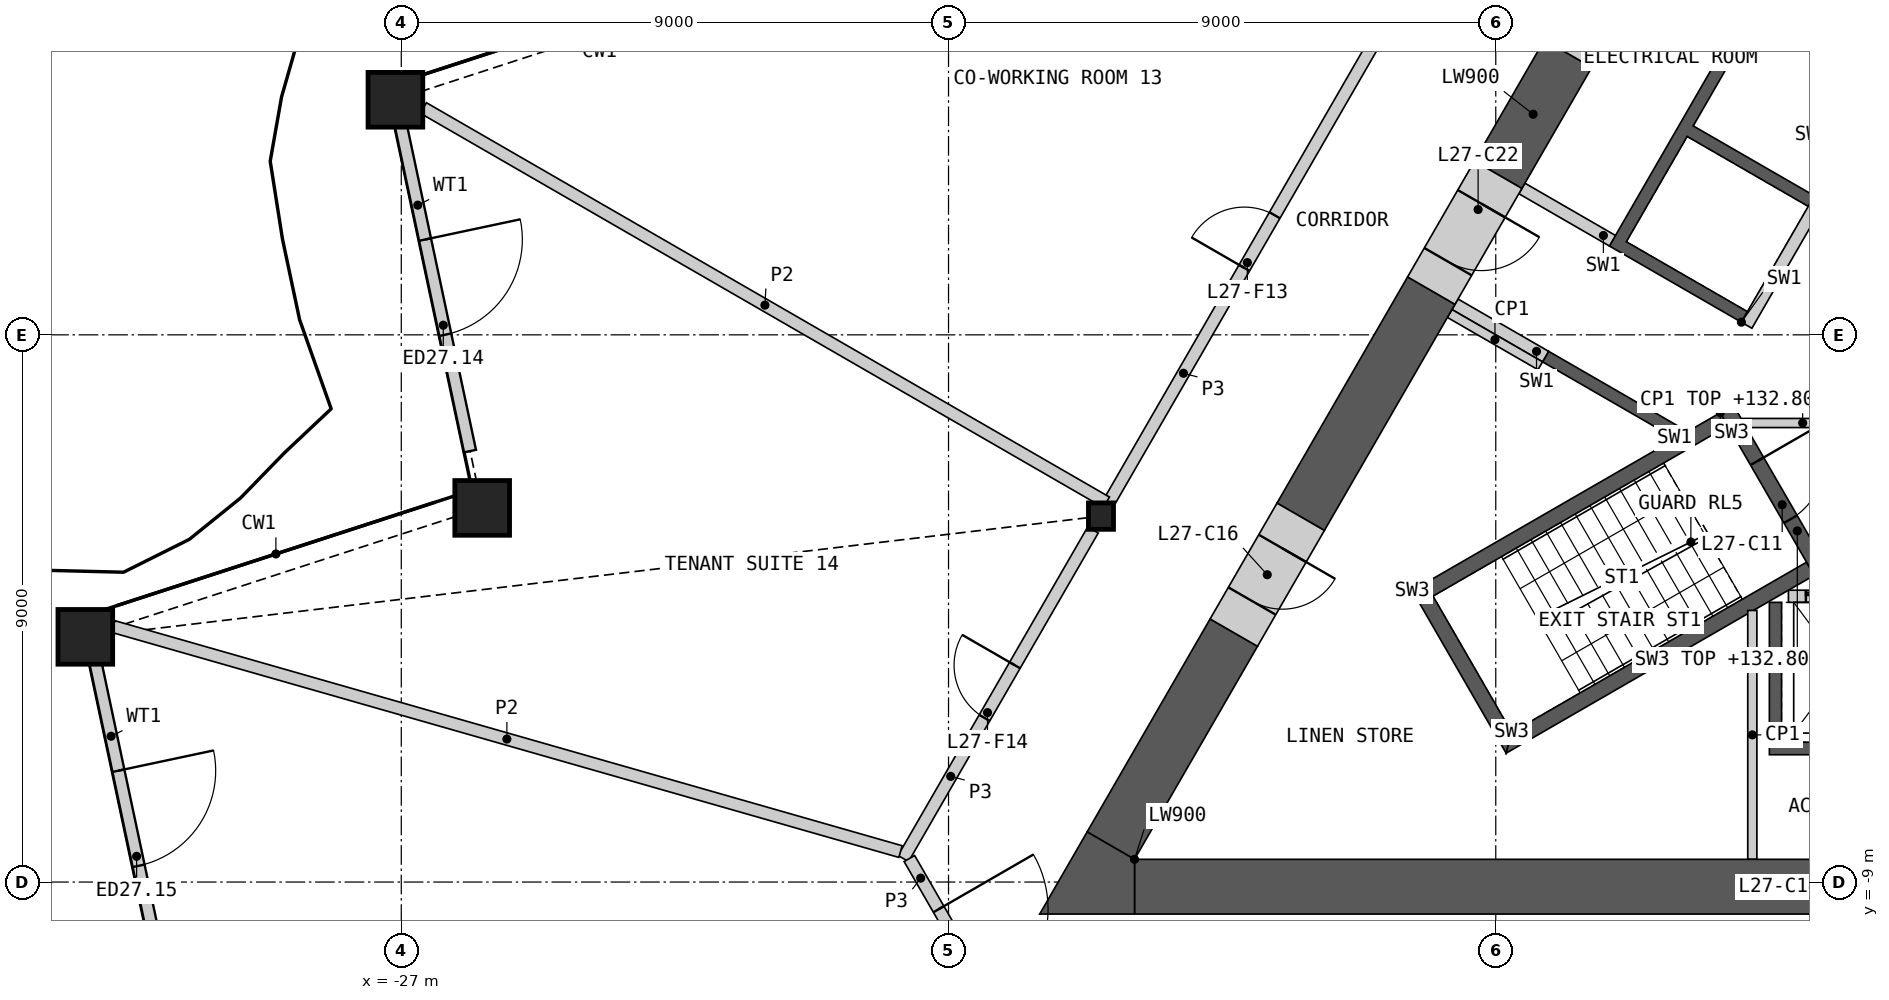
"""IFC4 building model, lengths in metres.
Left out: names, types, materials, properties, quantities, classifications, styles, units other than length and angle.
Written with IfcOpenShell. Run it as: python <this file> out.ifc"""

import sys

from ifc_helpers import new_model, si_unit, direction, frame, frame_2d, origin, origin_2d, place, context, subcontext, project, spatial, polyline, rectangle, hollow_rectangle, i_section, outline, extrude, element, fill, save


model = new_model("IFC4")
c1 = context("Model", 3, precision=1e-05, world=origin(), true_north=direction((0.0, 1.0)))
c2 = subcontext(c1, "Body", "Model", "MODEL_VIEW")
j1 = project(units=[si_unit("LENGTHUNIT", "METRE"), si_unit("PLANEANGLEUNIT", "RADIAN")], contexts=[c1])
p1 = place(None, origin())
s1 = spatial("IfcSite", under=j1, at=p1, CompositionType="ELEMENT")
p2 = place(p1, origin())
s2 = spatial("IfcBuilding", under=s1, at=p2, CompositionType="ELEMENT")
p3 = place(p2, frame((0.0, 0.0, 129.0)))
s3 = spatial("IfcBuildingStorey", under=s2, at=p3, CompositionType="ELEMENT", Elevation=129.0)
for number, where, z_axis, x_axis in (
    (1, (-27.096, 3.866, 0.0), (0.0, 0.0, 1.0), (1.0, 0.0, 0.0)),
    (2, (-25.669, -2.846, 0.0), (0.0, 0.0, 1.0), (1.0, 0.0, 0.0)),
    (3, (-32.196, -4.967, 0.0), (0.0, 0.0, 1.0), (1.0, 0.0, 0.0)),
):
    element("IfcColumn", number, at=place(p3, frame(where, z_axis=z_axis, x_axis=x_axis)), inside=s3, PredefinedType="COLUMN", context=c2, shape_type="SweptSolid", body=[
        extrude(hollow_rectangle(XDim=0.9, YDim=0.9, WallThickness=0.06, at=origin_2d()), origin(), (0.0, 0.0, 1.0), 4.2),
    ])
p4 = place(p3, frame((-15.493, -2.982, 0.0), z_axis=(0.0, 0.0, 1.0), x_axis=(1.0, 0.0, 0.0)))
e4 = element("IfcColumn", 4, at=p4, inside=s3, PredefinedType="COLUMN", context=c2, shape_type="SweptSolid", body=[
    extrude(i_section(OverallWidth=0.412, OverallDepth=0.435, WebThickness=0.036, FlangeThickness=0.057, at=origin_2d()), origin(), (0.0, 0.0, 1.0), 4.2),
])
p5 = place(p3, frame((-27.016, 3.482, 0.0), z_axis=(0.0, 0.0, 1.0), x_axis=(0.207902173992, -0.978149623549, 0.0)))
e5 = element("IfcWall", 5, at=p5, inside=s3, PredefinedType="SOLIDWALL", context=c2, shape_type="SweptSolid", body=[
    extrude(rectangle(XDim=5.515, YDim=0.2, at=frame_2d((2.757, 0.0))), origin(), (0.0, 0.0, 1.0), 3.189),
])
p6 = place(p5, frame((1.957, 0.0, 0.0)))
e6 = element("IfcOpeningElement", 6, at=p6, cuts=e5, PredefinedType="OPENING", context=c2, shape_type="SweptSolid", body=[
    extrude(rectangle(XDim=1.6, YDim=2.4, at=frame_2d((0.8, 1.2))), frame((0.0, 0.11, 0.0), z_axis=(0.0, -1.0, 0.0), x_axis=(1.0, 0.0, 0.0)), (0.0, 0.0, 1.0), 0.22),
])
p7 = place(p3, frame((-32.059, -5.254, 0.0), z_axis=(0.0, 0.0, 1.0), x_axis=(0.207902173992, -0.978149623549, 0.0)))
e7 = element("IfcWall", 7, at=p7, inside=s3, PredefinedType="SOLIDWALL", context=c2, shape_type="SweptSolid", body=[
    extrude(rectangle(XDim=5.515, YDim=0.2, at=frame_2d((2.757, 0.0))), origin(), (0.0, 0.0, 1.0), 3.189),
])
p8 = place(p7, frame((1.957, 0.0, 0.0)))
e8 = element("IfcOpeningElement", 8, at=p8, cuts=e7, PredefinedType="OPENING", context=c2, shape_type="SweptSolid", body=[
    extrude(rectangle(XDim=1.6, YDim=2.4, at=frame_2d((0.8, 1.2))), frame((0.0, 0.11, 0.0), z_axis=(0.0, -1.0, 0.0), x_axis=(1.0, 0.0, 0.0)), (0.0, 0.0, 1.0), 0.22),
])
p9 = place(p3, origin())
e9 = element("IfcWall", 9, at=p9, inside=s3, PredefinedType="SHEAR", context=c2, shape_type="SweptSolid", body=[
    extrude(outline(polyline([(4.5, -4.4), (4.5, -6.906), (-4.5, -6.906), (-4.5, -4.4), (-4.3, -4.4), (-4.3, -6.7), (-2.3, -6.7), (-2.3, -4.4), (-2.1, -4.4), (-2.1, -6.7), (-0.1, -6.7), (-0.1, -4.4), (0.1, -4.4), (0.1, -6.7), (2.1, -6.7), (2.1, -4.4), (2.3, -4.4), (2.3, -6.7), (4.3, -6.7), (4.3, -4.4), (4.5, -4.4)])), origin(), (0.0, 0.0, 1.0), 3.8),
])
p10 = place(p3, frame((-4.187, -4.3, 0.0), z_axis=(0.0, 0.0, 1.0), x_axis=(1.0, 0.0, 0.0)))
e10 = element("IfcWall", 10, at=p10, inside=s3, PredefinedType="SOLIDWALL", context=c2, shape_type="SweptSolid", body=[
    extrude(rectangle(XDim=8.373, YDim=0.2, at=frame_2d((4.187, 0.0))), origin(), (0.0, 0.0, 1.0), 3.8),
])
p11 = place(p10, frame((0.287, 0.0, 0.0)))
e11 = element("IfcOpeningElement", 11, at=p11, cuts=e10, PredefinedType="OPENING", context=c2, shape_type="SweptSolid", body=[
    extrude(rectangle(XDim=1.2, YDim=2.1, at=frame_2d((0.6, 1.05))), frame((0.0, 0.11, 0.0), z_axis=(0.0, -1.0, 0.0), x_axis=(1.0, 0.0, 0.0)), (0.0, 0.0, 1.0), 0.22),
])
p12 = place(p10, frame((2.387, 0.0, 0.0)))
e12 = element("IfcOpeningElement", 12, at=p12, cuts=e10, PredefinedType="OPENING", context=c2, shape_type="SweptSolid", body=[
    extrude(rectangle(XDim=1.4, YDim=2.1, at=frame_2d((0.7, 1.05))), frame((0.0, 0.11, 0.0), z_axis=(0.0, -1.0, 0.0), x_axis=(1.0, 0.0, 0.0)), (0.0, 0.0, 1.0), 0.22),
])
p13 = place(p10, frame((4.737, 0.0, 0.0)))
e13 = element("IfcOpeningElement", 13, at=p13, cuts=e10, PredefinedType="OPENING", context=c2, shape_type="SweptSolid", body=[
    extrude(rectangle(XDim=1.1, YDim=2.1, at=frame_2d((0.55, 1.05))), frame((0.0, 0.11, 0.0), z_axis=(0.0, -1.0, 0.0), x_axis=(1.0, 0.0, 0.0)), (0.0, 0.0, 1.0), 0.22),
])
p14 = place(p10, frame((6.887, 0.0, 0.0)))
e14 = element("IfcOpeningElement", 14, at=p14, cuts=e10, PredefinedType="OPENING", context=c2, shape_type="SweptSolid", body=[
    extrude(rectangle(XDim=1.2, YDim=2.1, at=frame_2d((0.6, 1.05))), frame((0.0, 0.11, 0.0), z_axis=(0.0, -1.0, 0.0), x_axis=(1.0, 0.0, 0.0)), (0.0, 0.0, 1.0), 0.22),
])
p15 = place(p3, origin())
e15 = element("IfcWall", 15, at=p15, inside=s3, PredefinedType="SHEAR", context=c2, shape_type="SweptSolid", body=[
    extrude(outline(polyline([(-6.061, -1.697), (-8.231, -0.444), (-8.131, -0.271), (-5.96, -1.524), (-6.061, -1.697)])), origin(), (0.0, 0.0, 1.0), 3.8),
])
p16 = place(p3, origin())
e16 = element("IfcWall", 16, at=p16, inside=s3, PredefinedType="SHEAR", context=c2, shape_type="SweptSolid", body=[
    extrude(outline(polyline([(-4.96, 0.208), (-7.131, 1.461), (-3.731, 7.35), (-1.561, 6.097), (-1.66, 5.924), (-3.652, 7.074), (-5.752, 3.437), (-3.76, 2.287), (-3.861, 2.113), (-5.852, 3.263), (-6.852, 1.531), (-4.861, 0.381), (-4.96, 0.208)])), origin(), (0.0, 0.0, 1.0), 3.8),
])
p17 = place(p3, frame((-1.631, 5.776, 0.0), z_axis=(0.0, 0.0, 1.0), x_axis=(-0.499992876559, -0.866029516466, 0.0)))
e17 = element("IfcWall", 17, at=p17, inside=s3, PredefinedType="SOLIDWALL", context=c2, shape_type="SweptSolid", body=[
    extrude(rectangle(XDim=6.486, YDim=0.2, at=frame_2d((3.243, 0.0))), origin(), (0.0, 0.0, 1.0), 3.8),
])
p18 = place(p17, frame((1.537, 0.0, 0.0)))
e18 = element("IfcOpeningElement", 18, at=p18, cuts=e17, PredefinedType="OPENING", context=c2, shape_type="SweptSolid", body=[
    extrude(rectangle(XDim=0.9, YDim=2.1, at=frame_2d((0.45, 1.05))), frame((0.0, 0.11, 0.0), z_axis=(0.0, -1.0, 0.0), x_axis=(1.0, 0.0, 0.0)), (0.0, 0.0, 1.0), 0.22),
])
for number, where, z_axis, x_axis in (
    (19, (-7.081, 1.548, 0.0), (0.0, 0.0, 1.0), (-0.866, 0.5, 0.0)),
    (20, (-8.181, -0.357, 0.0), (0.0, 0.0, 1.0), (-0.866, 0.5, 0.0)),
):
    element("IfcWall", number, at=place(p3, frame(where, z_axis=z_axis, x_axis=x_axis)), inside=s3, PredefinedType="SHEAR", context=c2, shape_type="SweptSolid", body=[
        extrude(rectangle(XDim=1.72, YDim=0.2, at=frame_2d((0.86, 0.0))), origin(), (0.0, 0.0, 1.0), 3.8),
    ])
p19 = place(p3, frame((-4.941, -1.45, 0.0), z_axis=(0.0, 0.0, 1.0), x_axis=(1.0, 0.0, 0.0)))
e21 = element("IfcWall", 21, at=p19, inside=s3, PredefinedType="PARTITIONING", context=c2, shape_type="SweptSolid", body=[
    extrude(rectangle(XDim=9.882, YDim=0.15, at=frame_2d((4.941, 0.0))), origin(), (0.0, 0.0, 1.0), 3.8),
])
p20 = place(p19, frame((4.391, 0.0, 0.0)))
e22 = element("IfcOpeningElement", 22, at=p20, cuts=e21, PredefinedType="OPENING", context=c2, shape_type="SweptSolid", body=[
    extrude(rectangle(XDim=1.1, YDim=2.1, at=frame_2d((0.55, 1.05))), frame((0.0, 0.085, 0.0), z_axis=(0.0, -1.0, 0.0), x_axis=(1.0, 0.0, 0.0)), (0.0, 0.0, 1.0), 0.17),
])
p21 = place(p3, origin())
e23 = element("IfcWall", 23, at=p21, inside=s3, PredefinedType="SHEAR", context=c2, shape_type="SweptSolid", body=[
    extrude(outline(polyline([(-5.307, -1.281), (-10.374, -4.206), (-10.032, -4.298), (-5.182, -1.498), (-5.307, -1.281)])), origin(), (0.0, 0.0, 1.0), 3.8),
])
p22 = place(p3, origin())
e24 = element("IfcWall", 24, at=p22, inside=s3, PredefinedType="SHEAR", context=c2, shape_type="SweptSolid", body=[
    extrude(outline(polyline([(-10.374, -4.206), (-8.83, -6.881), (-8.738, -6.539), (-10.032, -4.298), (-10.374, -4.206)])), origin(), (0.0, 0.0, 1.0), 3.8),
])
p23 = place(p3, origin())
e25 = element("IfcWall", 25, at=p23, inside=s3, PredefinedType="SHEAR", context=c2, shape_type="SweptSolid", body=[
    extrude(outline(polyline([(-8.738, -6.539), (-8.83, -6.881), (-3.763, -3.956), (-3.888, -3.739), (-8.738, -6.539)])), origin(), (0.0, 0.0, 1.0), 3.8),
])
p24 = place(p3, frame((-5.199, -1.219, 0.0), z_axis=(0.0, 0.0, 1.0), x_axis=(0.499982516597, -0.866035497597, 0.0)))
e26 = element("IfcWall", 26, at=p24, inside=s3, PredefinedType="SHEAR", context=c2, shape_type="SweptSolid", body=[
    extrude(rectangle(XDim=3.088, YDim=0.25, at=frame_2d((1.544, 0.0))), origin(), (0.0, 0.0, 1.0), 3.8),
])
p25 = place(p24, frame((0.994, 0.0, 0.0)))
e27 = element("IfcOpeningElement", 27, at=p25, cuts=e26, PredefinedType="OPENING", context=c2, shape_type="SweptSolid", body=[
    extrude(rectangle(XDim=1.1, YDim=2.1, at=frame_2d((0.55, 1.05))), frame((0.0, 0.135, 0.0), z_axis=(0.0, -1.0, 0.0), x_axis=(1.0, 0.0, 0.0)), (0.0, 0.0, 1.0), 0.27),
])
p26 = place(p3, frame((-8.268, -0.509, 0.0), z_axis=(0.0, 0.0, 1.0), x_axis=(-0.866024871741, 0.500000921525, 0.0)))
e28 = element("IfcWall", 28, at=p26, inside=s3, PredefinedType="PARTITIONING", context=c2, shape_type="SweptSolid", body=[
    extrude(rectangle(XDim=1.72, YDim=0.15, at=frame_2d((0.86, 0.0))), origin(), (0.0, 0.0, 1.0), 3.8),
])
p27 = place(p3, frame((-4.781, -8.626, 0.0), z_axis=(0.0, 0.0, 1.0), x_axis=(0.0, 1.0, 0.0)))
e29 = element("IfcWall", 29, at=p27, inside=s3, PredefinedType="PARTITIONING", context=c2, shape_type="SweptSolid", body=[
    extrude(rectangle(XDim=4.093, YDim=0.15, at=frame_2d((2.047, 0.0))), origin(), (0.0, 0.0, 1.0), 3.8),
])
p28 = place(p3, frame((-14.941, -9.076, 0.0), z_axis=(0.0, 0.0, 1.0), x_axis=(1.0, 0.0, 0.0)))
e30 = element("IfcWall", 30, at=p28, inside=s3, PredefinedType="SHEAR", context=c2, shape_type="SweptSolid", body=[
    extrude(rectangle(XDim=11.275, YDim=0.9, at=frame_2d((5.638, 0.0))), origin(), (0.0, 0.0, 1.0), 3.8),
])
p29 = place(p3, frame((-10.06, 0.728, 0.0), z_axis=(0.0, 0.0, 1.0), x_axis=(-0.499996331799, -0.866027521611, 0.0)))
e31 = element("IfcWall", 31, at=p29, inside=s3, PredefinedType="SHEAR", context=c2, shape_type="SweptSolid", body=[
    extrude(rectangle(XDim=4.295, YDim=0.9, at=frame_2d((2.148, 0.0))), origin(), (0.0, 0.0, 1.0), 3.8),
])
p30 = place(p3, frame((-13.308, -4.898, 0.0), z_axis=(0.0, 0.0, 1.0), x_axis=(-0.499974938593, -0.866039872511, 0.0)))
e32 = element("IfcWall", 32, at=p30, inside=s3, PredefinedType="SHEAR", context=c2, shape_type="SweptSolid", body=[
    extrude(rectangle(XDim=4.046, YDim=0.9, at=frame_2d((2.023, 0.0))), origin(), (0.0, 0.0, 1.0), 3.8),
])
p31 = place(p3, frame((-7.81, 4.625, 0.0), z_axis=(0.0, 0.0, 1.0), x_axis=(-0.499952165731, -0.866053019151, 0.0)))
e33 = element("IfcWall", 33, at=p31, inside=s3, PredefinedType="SHEAR", context=c2, shape_type="SweptSolid", body=[
    extrude(rectangle(XDim=2.3, YDim=0.9, at=frame_2d((1.15, 0.0))), origin(), (0.0, 0.0, 1.0), 3.8),
])
p32 = place(p3, origin())
e34 = element("IfcWall", 34, at=p32, inside=s3, PredefinedType="SHEAR", context=c2, shape_type="SweptSolid", body=[
    extrude(outline(polyline([(-14.941, -8.626), (-14.941, -9.526), (-16.5, -9.526), (-15.721, -8.176), (-14.941, -8.626)])), origin(), (0.0, 0.0, 1.0), 3.8),
])
p33 = place(p3, frame((-12.208, -2.992, 0.0), z_axis=(0.0, 0.0, 1.0), x_axis=(-0.50002983664, -0.866008176907, 0.0)))
e35 = element("IfcWall", 35, at=p33, inside=s3, PredefinedType="SHEAR", context=c2, shape_type="SweptSolid", body=[
    extrude(rectangle(XDim=2.2, YDim=0.9, at=frame_2d((1.1, 0.0))), origin(), (0.0, 0.0, 1.0), 3.8),
])
p34 = place(p33, frame((0.6, 0.0, 0.0)))
e36 = element("IfcOpeningElement", 36, at=p34, cuts=e35, PredefinedType="OPENING", context=c2, shape_type="SweptSolid", body=[
    extrude(rectangle(XDim=1.0, YDim=2.1, at=frame_2d((0.5, 1.05))), frame((0.0, 0.46, 0.0), z_axis=(0.0, -1.0, 0.0), x_axis=(1.0, 0.0, 0.0)), (0.0, 0.0, 1.0), 0.92),
])
p35 = place(p3, frame((-6.71, 6.53, 0.0), z_axis=(0.0, 0.0, 1.0), x_axis=(-0.50002983664, -0.866008176907, 0.0)))
e37 = element("IfcWall", 37, at=p35, inside=s3, PredefinedType="SHEAR", context=c2, shape_type="SweptSolid", body=[
    extrude(rectangle(XDim=2.2, YDim=0.9, at=frame_2d((1.1, 0.0))), origin(), (0.0, 0.0, 1.0), 3.8),
])
p36 = place(p35, frame((0.6, 0.0, 0.0)))
e38 = element("IfcOpeningElement", 38, at=p36, cuts=e37, PredefinedType="OPENING", context=c2, shape_type="SweptSolid", body=[
    extrude(rectangle(XDim=1.0, YDim=2.1, at=frame_2d((0.5, 1.05))), frame((0.0, 0.46, 0.0), z_axis=(0.0, -1.0, 0.0), x_axis=(1.0, 0.0, 0.0)), (0.0, 0.0, 1.0), 0.92),
])
p37 = place(p3, frame((-8.96, 2.633, 0.0), z_axis=(0.0, 0.0, 1.0), x_axis=(-0.50002983664, -0.866008176907, 0.0)))
e39 = element("IfcWall", 39, at=p37, inside=s3, PredefinedType="SHEAR", context=c2, shape_type="SweptSolid", body=[
    extrude(rectangle(XDim=2.2, YDim=0.9, at=frame_2d((1.1, 0.0))), origin(), (0.0, 0.0, 1.0), 3.8),
])
p38 = place(p37, frame((0.55, 0.0, 0.0)))
e40 = element("IfcOpeningElement", 40, at=p38, cuts=e39, PredefinedType="OPENING", context=c2, shape_type="SweptSolid", body=[
    extrude(rectangle(XDim=1.1, YDim=2.1, at=frame_2d((0.55, 1.05))), frame((0.0, 0.46, 0.0), z_axis=(0.0, -1.0, 0.0), x_axis=(1.0, 0.0, 0.0)), (0.0, 0.0, 1.0), 0.92),
])
p39 = place(p3, frame((-15.361, -2.754, 0.0), z_axis=(0.0, 0.0, 1.0), x_axis=(0.500004141693, 0.866023012564, 0.0)))
e41 = element("IfcWall", 41, at=p39, inside=s3, PredefinedType="PARTITIONING", context=c2, shape_type="SweptSolid", body=[
    extrude(rectangle(XDim=9.803, YDim=0.2, at=frame_2d((4.902, 0.0))), origin(), (0.0, 0.0, 1.0), 3.8),
])
p40 = place(p39, frame((4.452, 0.0, 0.0)))
e42 = element("IfcOpeningElement", 42, at=p40, cuts=e41, PredefinedType="OPENING", context=c2, shape_type="SweptSolid", body=[
    extrude(rectangle(XDim=1.0, YDim=2.1, at=frame_2d((0.5, 1.05))), frame((0.0, 0.11, 0.0), z_axis=(0.0, -1.0, 0.0), x_axis=(1.0, 0.0, 0.0)), (0.0, 0.0, 1.0), 0.22),
])
p41 = place(p3, frame((-18.744, -8.613, 0.0), z_axis=(0.0, 0.0, 1.0), x_axis=(0.499997920671, 0.866026604282, 0.0)))
e43 = element("IfcWall", 43, at=p41, inside=s3, PredefinedType="PARTITIONING", context=c2, shape_type="SweptSolid", body=[
    extrude(rectangle(XDim=6.24, YDim=0.2, at=frame_2d((3.12, 0.0))), origin(), (0.0, 0.0, 1.0), 3.8),
])
p42 = place(p41, frame((2.67, 0.0, 0.0)))
e44 = element("IfcOpeningElement", 44, at=p42, cuts=e43, PredefinedType="OPENING", context=c2, shape_type="SweptSolid", body=[
    extrude(rectangle(XDim=1.0, YDim=2.1, at=frame_2d((0.5, 1.05))), frame((0.0, 0.11, 0.0), z_axis=(0.0, -1.0, 0.0), x_axis=(1.0, 0.0, 0.0)), (0.0, 0.0, 1.0), 0.22),
])
p43 = place(p3, frame((-18.644, -8.613, 0.0), z_axis=(0.0, 0.0, 1.0), x_axis=(0.499958791762, -0.866049194065, 0.0)))
e45 = element("IfcWall", 45, at=p43, inside=s3, PredefinedType="PARTITIONING", context=c2, shape_type="SweptSolid", body=[
    extrude(rectangle(XDim=3.726, YDim=0.2, at=frame_2d((1.863, 0.0))), origin(), (0.0, 0.0, 1.0), 3.8),
])
p44 = place(p43, frame((0.963, 0.0, 0.0)))
e46 = element("IfcOpeningElement", 46, at=p44, cuts=e45, PredefinedType="OPENING", context=c2, shape_type="SweptSolid", body=[
    extrude(rectangle(XDim=1.8, YDim=2.1, at=frame_2d((0.9, 1.05))), frame((0.0, 0.11, 0.0), z_axis=(0.0, -1.0, 0.0), x_axis=(1.0, 0.0, 0.0)), (0.0, 0.0, 1.0), 0.22),
])
p45 = place(p3, frame((-31.736, -4.798, 0.0), z_axis=(0.0, 0.0, 1.0), x_axis=(0.961478776026, -0.274879179372, 0.0)))
e47 = element("IfcWall", 47, at=p45, inside=s3, PredefinedType="PARTITIONING", context=c2, shape_type="SweptSolid", body=[
    extrude(rectangle(XDim=13.465, YDim=0.2, at=frame_2d((6.732, 0.0))), origin(), (0.0, 0.0, 1.0), 2.885),
])
p46 = place(p3, frame((-26.636, 3.731, 0.0), z_axis=(0.0, 0.0, 1.0), x_axis=(0.866024473704, -0.500001610943, 0.0)))
e48 = element("IfcWall", 48, at=p46, inside=s3, PredefinedType="PARTITIONING", context=c2, shape_type="SweptSolid", body=[
    extrude(rectangle(XDim=12.971, YDim=0.2, at=frame_2d((6.485, 0.0))), origin(), (0.0, 0.0, 1.0), 2.885),
])
p47 = place(p6, origin())
e49 = element("IfcDoor", 49, at=p47, inside=s3, OperationType="DOUBLE_DOOR_SINGLE_SWING", PredefinedType="DOOR", context=c2, shape_type="SweptSolid", body=[
    extrude(rectangle(XDim=1.6, YDim=2.4, at=frame_2d((0.8, 1.2))), frame((0.0, 0.025, 0.0), z_axis=(0.0, -1.0, 0.0), x_axis=(1.0, 0.0, 0.0)), (0.0, 0.0, 1.0), 0.05),
])
fill(e6, e49)
p48 = place(p8, origin())
e50 = element("IfcDoor", 50, at=p48, inside=s3, OperationType="DOUBLE_DOOR_SINGLE_SWING", PredefinedType="DOOR", context=c2, shape_type="SweptSolid", body=[
    extrude(rectangle(XDim=1.6, YDim=2.4, at=frame_2d((0.8, 1.2))), frame((0.0, 0.025, 0.0), z_axis=(0.0, -1.0, 0.0), x_axis=(1.0, 0.0, 0.0)), (0.0, 0.0, 1.0), 0.05),
])
fill(e8, e50)
p49 = place(p11, origin())
e51 = element("IfcDoor", 51, at=p49, inside=s3, OperationType="SLIDING_TO_LEFT", PredefinedType="DOOR", context=c2, shape_type="SweptSolid", body=[
    extrude(rectangle(XDim=1.2, YDim=2.1, at=frame_2d((0.6, 1.05))), frame((0.0, 0.025, 0.0), z_axis=(0.0, -1.0, 0.0), x_axis=(1.0, 0.0, 0.0)), (0.0, 0.0, 1.0), 0.05),
])
fill(e11, e51)
p50 = place(p25, origin())
e52 = element("IfcDoor", 52, at=p50, inside=s3, OperationType="SINGLE_SWING_LEFT", PredefinedType="DOOR", context=c2, shape_type="SweptSolid", body=[
    extrude(rectangle(XDim=1.1, YDim=2.1, at=frame_2d((0.55, 1.05))), frame((0.0, 0.025, 0.0), z_axis=(0.0, -1.0, 0.0), x_axis=(1.0, 0.0, 0.0)), (0.0, 0.0, 1.0), 0.05),
])
fill(e27, e52)
p51 = place(p34, origin())
e53 = element("IfcDoor", 53, at=p51, inside=s3, OperationType="SINGLE_SWING_LEFT", PredefinedType="DOOR", context=c2, shape_type="SweptSolid", body=[
    extrude(rectangle(XDim=1.0, YDim=2.1, at=frame_2d((0.5, 1.05))), frame((0.0, 0.205, 0.0), z_axis=(0.0, -1.0, 0.0), x_axis=(1.0, 0.0, 0.0)), (0.0, 0.0, 1.0), 0.05),
])
fill(e36, e53)
p52 = place(p38, origin())
e54 = element("IfcDoor", 54, at=p52, inside=s3, OperationType="SINGLE_SWING_LEFT", PredefinedType="DOOR", context=c2, shape_type="SweptSolid", body=[
    extrude(rectangle(XDim=1.1, YDim=2.1, at=frame_2d((0.55, 1.05))), frame((0.0, 0.205, 0.0), z_axis=(0.0, -1.0, 0.0), x_axis=(1.0, 0.0, 0.0)), (0.0, 0.0, 1.0), 0.05),
])
fill(e40, e54)
p53 = place(p40, origin())
e55 = element("IfcDoor", 55, at=p53, inside=s3, OperationType="SINGLE_SWING_LEFT", PredefinedType="DOOR", context=c2, shape_type="SweptSolid", body=[
    extrude(rectangle(XDim=1.0, YDim=2.1, at=frame_2d((0.5, 1.05))), frame((0.0, 0.025, 0.0), z_axis=(0.0, -1.0, 0.0), x_axis=(1.0, 0.0, 0.0)), (0.0, 0.0, 1.0), 0.05),
])
fill(e42, e55)
p54 = place(p42, origin())
e56 = element("IfcDoor", 56, at=p54, inside=s3, OperationType="SINGLE_SWING_RIGHT", PredefinedType="DOOR", context=c2, shape_type="SweptSolid", body=[
    extrude(rectangle(XDim=1.0, YDim=2.1, at=frame_2d((0.5, 1.05))), frame((0.0, 0.025, 0.0), z_axis=(0.0, -1.0, 0.0), x_axis=(1.0, 0.0, 0.0)), (0.0, 0.0, 1.0), 0.05),
])
fill(e44, e56)
p55 = place(p44, origin())
e57 = element("IfcDoor", 57, at=p55, inside=s3, OperationType="DOUBLE_DOOR_SINGLE_SWING", PredefinedType="DOOR", context=c2, shape_type="SweptSolid", body=[
    extrude(rectangle(XDim=1.8, YDim=2.1, at=frame_2d((0.9, 1.05))), frame((0.0, 0.025, 0.0), z_axis=(0.0, -1.0, 0.0), x_axis=(1.0, 0.0, 0.0)), (0.0, 0.0, 1.0), 0.05),
])
fill(e46, e57)
save(model, sys.argv[1])
